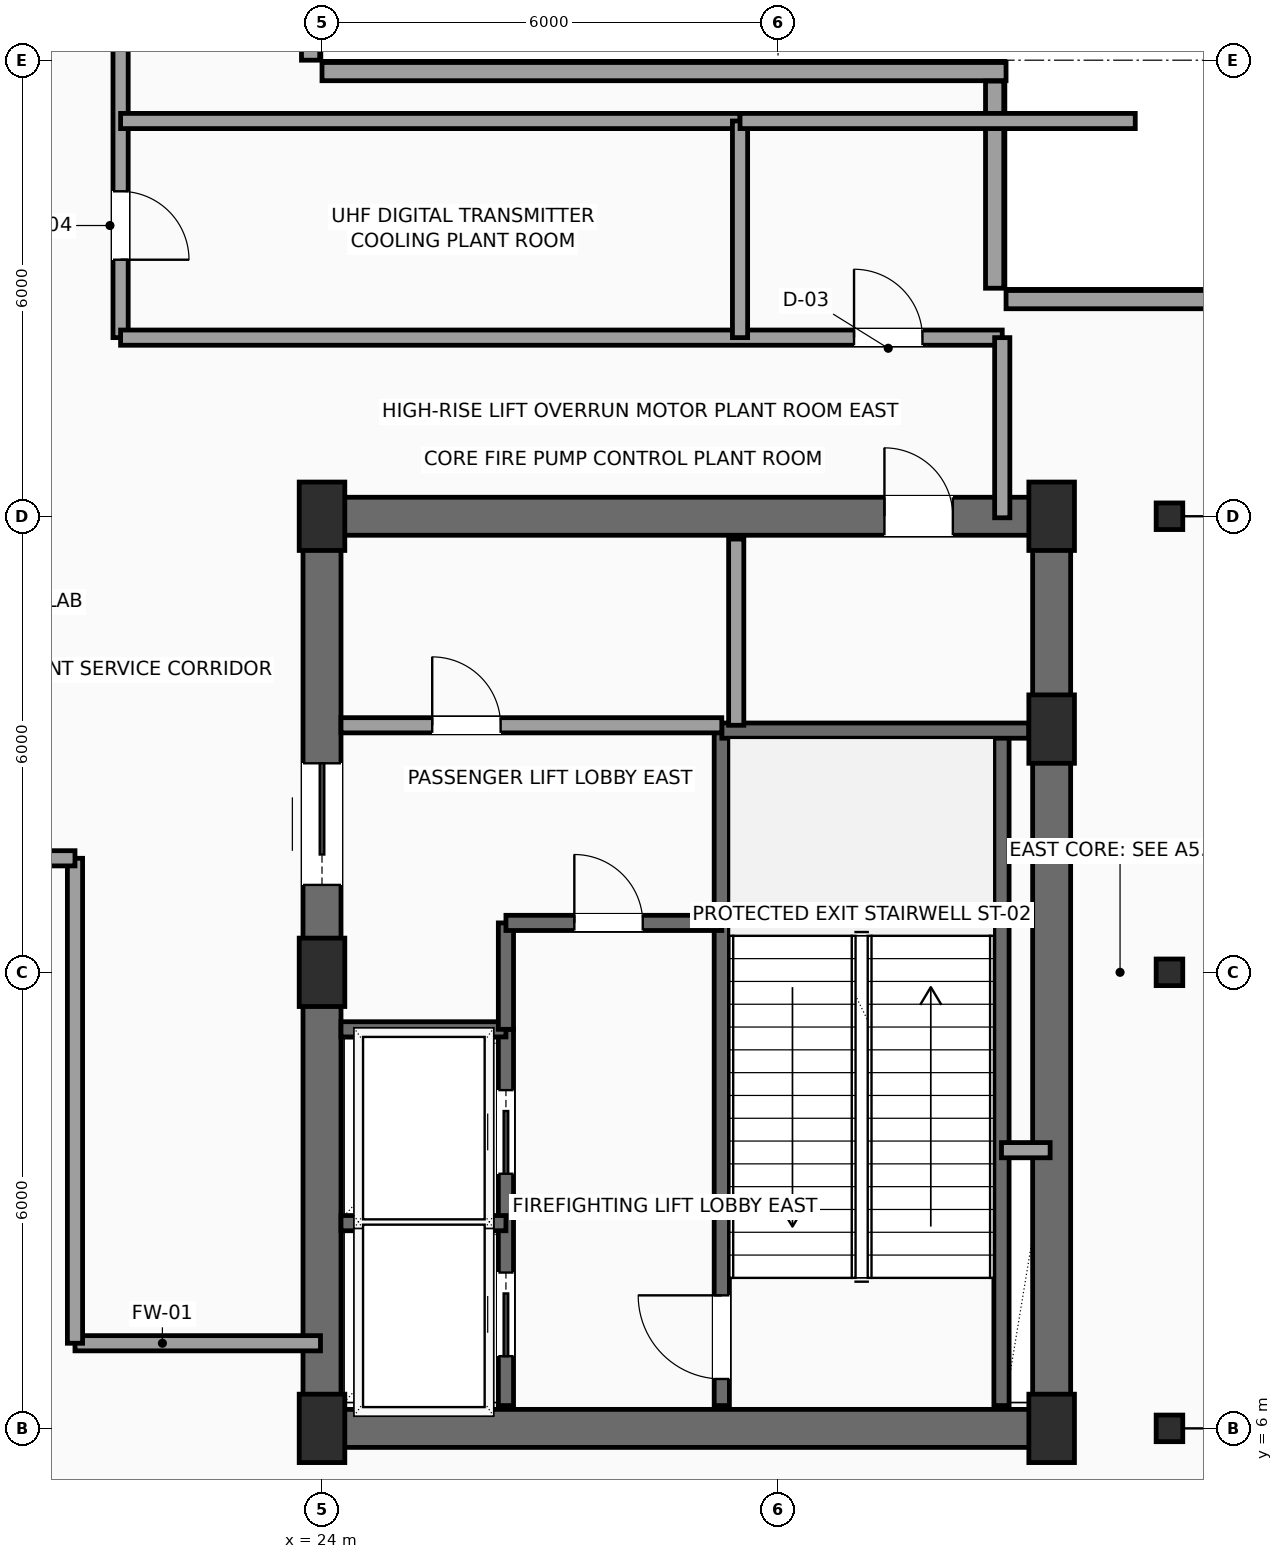
"""IFC4 building model, lengths in metres.
Left out: names, types, materials, properties, quantities, classifications, styles, units other than length and angle.
Written with IfcOpenShell. Run it as: python <this file> out.ifc"""

import sys

from ifc_helpers import new_model, si_unit, direction, frame, frame_2d, origin, origin_2d, place, context, subcontext, project, spatial, rectangle, hollow_rectangle, extrude, element, fill, save


model = new_model("IFC4")
c1 = context("Model", 3, precision=1e-05, world=origin(), true_north=direction((0.0, 1.0)))
c2 = subcontext(c1, "Body", "Model", "MODEL_VIEW")
j1 = project(units=[si_unit("LENGTHUNIT", "METRE"), si_unit("PLANEANGLEUNIT", "RADIAN")], contexts=[c1])
p1 = place(None, origin())
s1 = spatial("IfcSite", under=j1, at=p1, CompositionType="ELEMENT")
p2 = place(p1, origin())
s2 = spatial("IfcBuilding", under=s1, at=p2, CompositionType="ELEMENT")
p3 = place(p2, frame((0.0, 0.0, 300.9)))
s3 = spatial("IfcBuildingStorey", under=s2, at=p3, CompositionType="ELEMENT", Elevation=300.9)
for number, where, z_axis, x_axis in (
    (1, (24.0, 6.0, 0.0), (0.0, 0.0, 1.0), (1.0, 0.0, 0.0)),
    (2, (24.0, 12.0, 0.0), (0.0, 0.0, 1.0), (1.0, 0.0, 0.0)),
    (3, (24.0, 18.0, 0.0), (0.0, 0.0, 1.0), (1.0, 0.0, 0.0)),
    (4, (33.6, 6.0, 0.0), (0.0, 0.0, 1.0), (1.0, 0.0, 0.0)),
    (5, (33.6, 15.2, 0.0), (0.0, 0.0, 1.0), (1.0, 0.0, 0.0)),
    (6, (33.6, 18.0, 0.0), (0.0, 0.0, 1.0), (1.0, 0.0, 0.0)),
):
    element("IfcColumn", number, at=place(p3, frame(where, z_axis=z_axis, x_axis=x_axis)), inside=s3, PredefinedType="COLUMN", context=c2, shape_type="SweptSolid", body=[
        extrude(rectangle(XDim=0.6, YDim=0.9, at=origin_2d()), origin(), (0.0, 0.0, 1.0), 4.8),
    ])
for number, where, z_axis, x_axis in (
    (7, (35.15, 6.0, 0.0), (0.0, 0.0, 1.0), (1.0, 0.0, 0.0)),
    (8, (35.15, 12.0, 0.0), (0.0, 0.0, 1.0), (1.0, 0.0, 0.0)),
    (9, (35.15, 18.0, 0.0), (0.0, 0.0, 1.0), (1.0, 0.0, 0.0)),
):
    element("IfcColumn", number, at=place(p3, frame(where, z_axis=z_axis, x_axis=x_axis)), inside=s3, PredefinedType="COLUMN", context=c2, shape_type="SweptSolid", body=[
        extrude(hollow_rectangle(XDim=0.35, YDim=0.35, WallThickness=0.016, InnerFilletRadius=0.016, OuterFilletRadius=0.032, at=origin_2d()), origin(), (0.0, 0.0, 1.0), 4.8),
    ])
p4 = place(p3, frame((23.85, 26.725, 0.0), z_axis=(0.0, 0.0, 1.0), x_axis=(0.0, -1.0, 0.0)))
e10 = element("IfcWall", 10, at=p4, inside=s3, PredefinedType="SOLIDWALL", context=c2, shape_type="SweptSolid", body=[
    extrude(rectangle(XDim=2.725, YDim=0.24, at=frame_2d((1.363, 0.0))), origin(), (0.0, 0.0, 1.0), 4.525),
])
p5 = place(p3, frame((24.0, 23.85, 0.0), z_axis=(0.0, 0.0, 1.0), x_axis=(1.0, 0.0, 0.0)))
e11 = element("IfcWall", 11, at=p5, inside=s3, PredefinedType="SOLIDWALL", context=c2, shape_type="SweptSolid", body=[
    extrude(rectangle(XDim=9.0, YDim=0.24, at=frame_2d((4.5, 0.0))), origin(), (0.0, 0.0, 1.0), 4.525),
])
p6 = place(p3, frame((32.85, 23.725, 0.0), z_axis=(0.0, 0.0, 1.0), x_axis=(0.0, -1.0, 0.0)))
e12 = element("IfcWall", 12, at=p6, inside=s3, PredefinedType="SOLIDWALL", context=c2, shape_type="SweptSolid", body=[
    extrude(rectangle(XDim=2.725, YDim=0.24, at=frame_2d((1.363, 0.0))), origin(), (0.0, 0.0, 1.0), 4.525),
])
p7 = place(p3, frame((33.0, 20.85, 0.0), z_axis=(0.0, 0.0, 1.0), x_axis=(1.0, 0.0, 0.0)))
e13 = element("IfcWall", 13, at=p7, inside=s3, PredefinedType="SOLIDWALL", context=c2, shape_type="SweptSolid", body=[
    extrude(rectangle(XDim=3.0, YDim=0.24, at=frame_2d((1.5, 0.0))), origin(), (0.0, 0.0, 1.0), 4.525),
])
p8 = place(p3, frame((24.0, 6.0, 0.0), z_axis=(0.0, 0.0, 1.0), x_axis=(1.0, 0.0, 0.0)))
e14 = element("IfcWall", 14, at=p8, inside=s3, PredefinedType="SHEAR", context=c2, shape_type="SweptSolid", body=[
    extrude(rectangle(XDim=9.6, YDim=0.5, at=frame_2d((4.8, 0.0))), origin(), (0.0, 0.0, 1.0), 4.525),
])
p9 = place(p3, frame((24.0, 18.0, 0.0), z_axis=(0.0, 0.0, 1.0), x_axis=(1.0, 0.0, 0.0)))
e15 = element("IfcWall", 15, at=p9, inside=s3, PredefinedType="SHEAR", context=c2, shape_type="SweptSolid", body=[
    extrude(rectangle(XDim=9.6, YDim=0.5, at=frame_2d((4.8, 0.0))), origin(), (0.0, 0.0, 1.0), 4.525),
])
p10 = place(p9, frame((7.4, 0.0, 0.0)))
e16 = element("IfcOpeningElement", 16, at=p10, cuts=e15, PredefinedType="OPENING", context=c2, shape_type="SweptSolid", body=[
    extrude(rectangle(XDim=0.9, YDim=2.15, at=frame_2d((0.45, 1.075))), frame((0.0, 0.26, 0.0), z_axis=(0.0, -1.0, 0.0), x_axis=(1.0, 0.0, 0.0)), (0.0, 0.0, 1.0), 0.52),
])
p11 = place(p3, frame((24.0, 6.0, 0.0), z_axis=(0.0, 0.0, 1.0), x_axis=(0.0, 1.0, 0.0)))
e17 = element("IfcWall", 17, at=p11, inside=s3, PredefinedType="SHEAR", context=c2, shape_type="SweptSolid", body=[
    extrude(rectangle(XDim=12.0, YDim=0.5, at=frame_2d((6.0, 0.0))), origin(), (0.0, 0.0, 1.0), 4.525),
])
p12 = place(p11, frame((7.15, 0.0, 0.0)))
e18 = element("IfcOpeningElement", 18, at=p12, cuts=e17, PredefinedType="OPENING", context=c2, shape_type="SweptSolid", body=[
    extrude(rectangle(XDim=1.6, YDim=2.3, at=frame_2d((0.8, 1.15))), frame((0.0, 0.26, 0.0), z_axis=(0.0, -1.0, 0.0), x_axis=(1.0, 0.0, 0.0)), (0.0, 0.0, 1.0), 0.52),
])
p13 = place(p3, frame((33.6, 6.0, 0.0), z_axis=(0.0, 0.0, 1.0), x_axis=(0.0, 1.0, 0.0)))
e19 = element("IfcWall", 19, at=p13, inside=s3, PredefinedType="SHEAR", context=c2, shape_type="SweptSolid", body=[
    extrude(rectangle(XDim=12.0, YDim=0.5, at=frame_2d((6.0, 0.0))), origin(), (0.0, 0.0, 1.0), 4.525),
])
p14 = place(p3, frame((29.26, 6.3, 0.0), z_axis=(0.0, 0.0, 1.0), x_axis=(0.0, 1.0, 0.0)))
e20 = element("IfcWall", 20, at=p14, inside=s3, PredefinedType="SHEAR", context=c2, shape_type="SweptSolid", body=[
    extrude(rectangle(XDim=8.88, YDim=0.2, at=frame_2d((4.44, 0.0))), origin(), (0.0, 0.0, 1.0), 4.525),
])
p15 = place(p14, frame((0.35, 0.0, 0.0)))
e21 = element("IfcOpeningElement", 21, at=p15, cuts=e20, PredefinedType="OPENING", context=c2, shape_type="SweptSolid", body=[
    extrude(rectangle(XDim=1.1, YDim=2.2, at=frame_2d((0.55, 1.1))), frame((0.0, 0.11, 0.0), z_axis=(0.0, -1.0, 0.0), x_axis=(1.0, 0.0, 0.0)), (0.0, 0.0, 1.0), 0.22),
])
p16 = place(p3, frame((32.94, 6.3, 0.0), z_axis=(0.0, 0.0, 1.0), x_axis=(0.0, 1.0, 0.0)))
e22 = element("IfcWall", 22, at=p16, inside=s3, PredefinedType="SHEAR", context=c2, shape_type="SweptSolid", body=[
    extrude(rectangle(XDim=8.88, YDim=0.2, at=frame_2d((4.44, 0.0))), origin(), (0.0, 0.0, 1.0), 4.525),
])
p17 = place(p3, frame((29.26, 15.18, 0.0), z_axis=(0.0, 0.0, 1.0), x_axis=(1.0, 0.0, 0.0)))
e23 = element("IfcWall", 23, at=p17, inside=s3, PredefinedType="SHEAR", context=c2, shape_type="SweptSolid", body=[
    extrude(rectangle(XDim=4.04, YDim=0.2, at=frame_2d((2.02, 0.0))), origin(), (0.0, 0.0, 1.0), 4.525),
])
p18 = place(p3, frame((26.42, 6.3, 0.0), z_axis=(0.0, 0.0, 1.0), x_axis=(0.0, 1.0, 0.0)))
e24 = element("IfcWall", 24, at=p18, inside=s3, PredefinedType="SHEAR", context=c2, shape_type="SweptSolid", body=[
    extrude(rectangle(XDim=4.95, YDim=0.2, at=frame_2d((2.475, 0.0))), origin(), (0.0, 0.0, 1.0), 4.525),
])
p19 = place(p18, frame((0.65, 0.0, 0.0)))
e25 = element("IfcOpeningElement", 25, at=p19, cuts=e24, PredefinedType="OPENING", context=c2, shape_type="SweptSolid", body=[
    extrude(rectangle(XDim=1.1, YDim=2.2, at=frame_2d((0.55, 1.1))), frame((0.0, 0.11, 0.0), z_axis=(0.0, -1.0, 0.0), x_axis=(1.0, 0.0, 0.0)), (0.0, 0.0, 1.0), 0.22),
])
p20 = place(p18, frame((3.05, 0.0, 0.0)))
e26 = element("IfcOpeningElement", 26, at=p20, cuts=e24, PredefinedType="OPENING", context=c2, shape_type="SweptSolid", body=[
    extrude(rectangle(XDim=1.1, YDim=2.2, at=frame_2d((0.55, 1.1))), frame((0.0, 0.11, 0.0), z_axis=(0.0, -1.0, 0.0), x_axis=(1.0, 0.0, 0.0)), (0.0, 0.0, 1.0), 0.22),
])
for number, where, z_axis, x_axis in (
    (27, (24.25, 8.7, 0.0), (0.0, 0.0, 1.0), (1.0, 0.0, 0.0)),
    (28, (24.25, 11.25, 0.0), (0.0, 0.0, 1.0), (1.0, 0.0, 0.0)),
):
    element("IfcWall", number, at=place(p3, frame(where, z_axis=z_axis, x_axis=x_axis)), inside=s3, PredefinedType="SHEAR", context=c2, shape_type="SweptSolid", body=[
        extrude(rectangle(XDim=2.17, YDim=0.2, at=frame_2d((1.085, 0.0))), origin(), (0.0, 0.0, 1.0), 4.525),
    ])
p21 = place(p3, frame((26.42, 11.25, 0.0), z_axis=(0.0, 0.0, 1.0), x_axis=(0.0, 1.0, 0.0)))
e29 = element("IfcWall", 29, at=p21, inside=s3, PredefinedType="SHEAR", context=c2, shape_type="SweptSolid", body=[
    extrude(rectangle(XDim=1.4, YDim=0.2, at=frame_2d((0.7, 0.0))), origin(), (0.0, 0.0, 1.0), 4.525),
])
p22 = place(p3, frame((26.42, 12.65, 0.0), z_axis=(0.0, 0.0, 1.0), x_axis=(1.0, 0.0, 0.0)))
e30 = element("IfcWall", 30, at=p22, inside=s3, PredefinedType="SHEAR", context=c2, shape_type="SweptSolid", body=[
    extrude(rectangle(XDim=2.84, YDim=0.2, at=frame_2d((1.42, 0.0))), origin(), (0.0, 0.0, 1.0), 4.525),
])
p23 = place(p22, frame((0.9, 0.0, 0.0)))
e31 = element("IfcOpeningElement", 31, at=p23, cuts=e30, PredefinedType="OPENING", context=c2, shape_type="SweptSolid", body=[
    extrude(rectangle(XDim=0.9, YDim=2.15, at=frame_2d((0.45, 1.075))), frame((0.0, 0.11, 0.0), z_axis=(0.0, -1.0, 0.0), x_axis=(1.0, 0.0, 0.0)), (0.0, 0.0, 1.0), 0.22),
])
p24 = place(p3, frame((32.94, 9.66, 0.0), z_axis=(0.0, 0.0, 1.0), x_axis=(1.0, 0.0, 0.0)))
e32 = element("IfcWall", 32, at=p24, inside=s3, PredefinedType="SOLIDWALL", context=c2, shape_type="SweptSolid", body=[
    extrude(rectangle(XDim=0.64, YDim=0.2, at=frame_2d((0.32, 0.0))), origin(), (0.0, 0.0, 1.0), 4.525),
])
p25 = place(p3, frame((24.25, 15.25, 0.0), z_axis=(0.0, 0.0, 1.0), x_axis=(1.0, 0.0, 0.0)))
e33 = element("IfcWall", 33, at=p25, inside=s3, PredefinedType="SOLIDWALL", context=c2, shape_type="SweptSolid", body=[
    extrude(rectangle(XDim=5.01, YDim=0.2, at=frame_2d((2.505, 0.0))), origin(), (0.0, 0.0, 1.0), 4.525),
])
p26 = place(p25, frame((1.2, 0.0, 0.0)))
e34 = element("IfcOpeningElement", 34, at=p26, cuts=e33, PredefinedType="OPENING", context=c2, shape_type="SweptSolid", body=[
    extrude(rectangle(XDim=0.9, YDim=2.15, at=frame_2d((0.45, 1.075))), frame((0.0, 0.11, 0.0), z_axis=(0.0, -1.0, 0.0), x_axis=(1.0, 0.0, 0.0)), (0.0, 0.0, 1.0), 0.22),
])
p27 = place(p3, frame((29.45, 15.25, 0.0), z_axis=(0.0, 0.0, 1.0), x_axis=(0.0, 1.0, 0.0)))
e35 = element("IfcWall", 35, at=p27, inside=s3, PredefinedType="SOLIDWALL", context=c2, shape_type="SweptSolid", body=[
    extrude(rectangle(XDim=2.45, YDim=0.2, at=frame_2d((1.225, 0.0))), origin(), (0.0, 0.0, 1.0), 4.525),
])
p28 = place(p3, frame((23.98, 7.12, 0.0), z_axis=(0.0, 0.0, 1.0), x_axis=(-1.0, 0.0, 0.0)))
e36 = element("IfcWall", 36, at=p28, inside=s3, PredefinedType="SOLIDWALL", context=c2, shape_type="SweptSolid", body=[
    extrude(rectangle(XDim=3.23, YDim=0.2, at=frame_2d((1.615, 0.0))), origin(), (0.0, 0.0, 1.0), 4.525),
])
p29 = place(p3, frame((20.75, 7.12, 0.0), z_axis=(0.0, 0.0, 1.0), x_axis=(0.0, 1.0, 0.0)))
e37 = element("IfcWall", 37, at=p29, inside=s3, PredefinedType="SOLIDWALL", context=c2, shape_type="SweptSolid", body=[
    extrude(rectangle(XDim=6.38, YDim=0.2, at=frame_2d((3.19, 0.0))), origin(), (0.0, 0.0, 1.0), 4.525),
])
p30 = place(p3, frame((20.75, 13.5, 0.0), z_axis=(0.0, 0.0, 1.0), x_axis=(-1.0, 0.0, 0.0)))
e38 = element("IfcWall", 38, at=p30, inside=s3, PredefinedType="SOLIDWALL", context=c2, shape_type="SweptSolid", body=[
    extrude(rectangle(XDim=13.55, YDim=0.2, at=frame_2d((6.775, 0.0))), origin(), (0.0, 0.0, 1.0), 4.525),
])
p31 = place(p30, frame((9.275, 0.0, 0.0)))
e39 = element("IfcOpeningElement", 39, at=p31, cuts=e38, PredefinedType="OPENING", context=c2, shape_type="SweptSolid", body=[
    extrude(rectangle(XDim=0.9, YDim=2.15, at=frame_2d((0.45, 1.075))), frame((0.0, 0.11, 0.0), z_axis=(0.0, -1.0, 0.0), x_axis=(1.0, 0.0, 0.0)), (0.0, 0.0, 1.0), 0.22),
])
p32 = place(p3, frame((21.35, 27.58, 0.0), z_axis=(0.0, 0.0, 1.0), x_axis=(0.0, -1.0, 0.0)))
e40 = element("IfcWall", 40, at=p32, inside=s3, PredefinedType="SOLIDWALL", context=c2, shape_type="SweptSolid", body=[
    extrude(rectangle(XDim=7.23, YDim=0.2, at=frame_2d((3.615, 0.0))), origin(), (0.0, 0.0, 1.0), 4.525),
])
p33 = place(p32, frame((5.305, 0.0, 0.0)))
e41 = element("IfcOpeningElement", 41, at=p33, cuts=e40, PredefinedType="OPENING", context=c2, shape_type="SweptSolid", body=[
    extrude(rectangle(XDim=0.9, YDim=2.15, at=frame_2d((0.45, 1.075))), frame((0.0, 0.11, 0.0), z_axis=(0.0, -1.0, 0.0), x_axis=(1.0, 0.0, 0.0)), (0.0, 0.0, 1.0), 0.22),
])
p34 = place(p3, frame((21.35, 20.35, 0.0), z_axis=(0.0, 0.0, 1.0), x_axis=(1.0, 0.0, 0.0)))
e42 = element("IfcWall", 42, at=p34, inside=s3, PredefinedType="SOLIDWALL", context=c2, shape_type="SweptSolid", body=[
    extrude(rectangle(XDim=11.6, YDim=0.2, at=frame_2d((5.8, 0.0))), origin(), (0.0, 0.0, 1.0), 4.525),
])
p35 = place(p34, frame((9.65, 0.0, 0.0)))
e43 = element("IfcOpeningElement", 43, at=p35, cuts=e42, PredefinedType="OPENING", context=c2, shape_type="SweptSolid", body=[
    extrude(rectangle(XDim=0.9, YDim=2.15, at=frame_2d((0.45, 1.075))), frame((0.0, 0.11, 0.0), z_axis=(0.0, -1.0, 0.0), x_axis=(1.0, 0.0, 0.0)), (0.0, 0.0, 1.0), 0.22),
])
p36 = place(p3, frame((32.95, 20.35, 0.0), z_axis=(0.0, 0.0, 1.0), x_axis=(0.0, -1.0, 0.0)))
e44 = element("IfcWall", 44, at=p36, inside=s3, PredefinedType="SOLIDWALL", context=c2, shape_type="SweptSolid", body=[
    extrude(rectangle(XDim=2.37, YDim=0.2, at=frame_2d((1.185, 0.0))), origin(), (0.0, 0.0, 1.0), 4.525),
])
p37 = place(p3, frame((21.35, 23.2, 0.0), z_axis=(0.0, 0.0, 1.0), x_axis=(1.0, 0.0, 0.0)))
e45 = element("IfcWall", 45, at=p37, inside=s3, PredefinedType="SOLIDWALL", context=c2, shape_type="SweptSolid", body=[
    extrude(rectangle(XDim=8.15, YDim=0.2, at=frame_2d((4.075, 0.0))), origin(), (0.0, 0.0, 1.0), 4.525),
])
p38 = place(p3, frame((29.5, 20.35, 0.0), z_axis=(0.0, 0.0, 1.0), x_axis=(0.0, 1.0, 0.0)))
e46 = element("IfcWall", 46, at=p38, inside=s3, PredefinedType="SOLIDWALL", context=c2, shape_type="SweptSolid", body=[
    extrude(rectangle(XDim=2.85, YDim=0.2, at=frame_2d((1.425, 0.0))), origin(), (0.0, 0.0, 1.0), 4.525),
])
p39 = place(p3, frame((29.5, 23.2, 0.0), z_axis=(0.0, 0.0, 1.0), x_axis=(1.0, 0.0, 0.0)))
e47 = element("IfcWall", 47, at=p39, inside=s3, PredefinedType="SOLIDWALL", context=c2, shape_type="SweptSolid", body=[
    extrude(rectangle(XDim=5.2, YDim=0.2, at=frame_2d((2.6, 0.0))), origin(), (0.0, 0.0, 1.0), 4.525),
])
p40 = place(p10, origin())
e48 = element("IfcDoor", 48, at=p40, inside=s3, OperationType="SINGLE_SWING_LEFT", PredefinedType="DOOR", context=c2, shape_type="SweptSolid", body=[
    extrude(rectangle(XDim=0.9, YDim=2.15, at=frame_2d((0.45, 1.075))), frame((0.0, 0.025, 0.0), z_axis=(0.0, -1.0, 0.0), x_axis=(1.0, 0.0, 0.0)), (0.0, 0.0, 1.0), 0.05),
])
fill(e16, e48)
p41 = place(p12, origin())
e49 = element("IfcDoor", 49, at=p41, inside=s3, OperationType="DOUBLE_DOOR_SLIDING", PredefinedType="DOOR", context=c2, shape_type="SweptSolid", body=[
    extrude(rectangle(XDim=1.6, YDim=2.3, at=frame_2d((0.8, 1.15))), frame((0.0, 0.025, 0.0), z_axis=(0.0, -1.0, 0.0), x_axis=(1.0, 0.0, 0.0)), (0.0, 0.0, 1.0), 0.05),
])
fill(e18, e49)
p42 = place(p15, origin())
e50 = element("IfcDoor", 50, at=p42, inside=s3, OperationType="SINGLE_SWING_RIGHT", PredefinedType="DOOR", context=c2, shape_type="SweptSolid", body=[
    extrude(rectangle(XDim=1.1, YDim=2.2, at=frame_2d((0.55, 1.1))), frame((0.0, 0.025, 0.0), z_axis=(0.0, -1.0, 0.0), x_axis=(1.0, 0.0, 0.0)), (0.0, 0.0, 1.0), 0.05),
])
fill(e21, e50)
p43 = place(p19, origin())
e51 = element("IfcDoor", 51, at=p43, inside=s3, OperationType="SLIDING_TO_LEFT", PredefinedType="DOOR", context=c2, shape_type="SweptSolid", body=[
    extrude(rectangle(XDim=1.1, YDim=2.2, at=frame_2d((0.55, 1.1))), frame((0.0, 0.025, 0.0), z_axis=(0.0, -1.0, 0.0), x_axis=(1.0, 0.0, 0.0)), (0.0, 0.0, 1.0), 0.05),
])
fill(e25, e51)
p44 = place(p20, origin())
e52 = element("IfcDoor", 52, at=p44, inside=s3, OperationType="SLIDING_TO_LEFT", PredefinedType="DOOR", context=c2, shape_type="SweptSolid", body=[
    extrude(rectangle(XDim=1.1, YDim=2.2, at=frame_2d((0.55, 1.1))), frame((0.0, 0.025, 0.0), z_axis=(0.0, -1.0, 0.0), x_axis=(1.0, 0.0, 0.0)), (0.0, 0.0, 1.0), 0.05),
])
fill(e26, e52)
p45 = place(p23, origin())
e53 = element("IfcDoor", 53, at=p45, inside=s3, OperationType="SINGLE_SWING_LEFT", PredefinedType="DOOR", context=c2, shape_type="SweptSolid", body=[
    extrude(rectangle(XDim=0.9, YDim=2.15, at=frame_2d((0.45, 1.075))), frame((0.0, 0.025, 0.0), z_axis=(0.0, -1.0, 0.0), x_axis=(1.0, 0.0, 0.0)), (0.0, 0.0, 1.0), 0.05),
])
fill(e31, e53)
p46 = place(p26, origin())
e54 = element("IfcDoor", 54, at=p46, inside=s3, OperationType="SINGLE_SWING_LEFT", PredefinedType="DOOR", context=c2, shape_type="SweptSolid", body=[
    extrude(rectangle(XDim=0.9, YDim=2.15, at=frame_2d((0.45, 1.075))), frame((0.0, 0.025, 0.0), z_axis=(0.0, -1.0, 0.0), x_axis=(1.0, 0.0, 0.0)), (0.0, 0.0, 1.0), 0.05),
])
fill(e34, e54)
p47 = place(p33, origin())
e55 = element("IfcDoor", 55, at=p47, inside=s3, OperationType="SINGLE_SWING_RIGHT", PredefinedType="DOOR", context=c2, shape_type="SweptSolid", body=[
    extrude(rectangle(XDim=0.9, YDim=2.15, at=frame_2d((0.45, 1.075))), frame((0.0, 0.025, 0.0), z_axis=(0.0, -1.0, 0.0), x_axis=(1.0, 0.0, 0.0)), (0.0, 0.0, 1.0), 0.05),
])
fill(e41, e55)
p48 = place(p35, origin())
e56 = element("IfcDoor", 56, at=p48, inside=s3, OperationType="SINGLE_SWING_LEFT", PredefinedType="DOOR", context=c2, shape_type="SweptSolid", body=[
    extrude(rectangle(XDim=0.9, YDim=2.15, at=frame_2d((0.45, 1.075))), frame((0.0, 0.025, 0.0), z_axis=(0.0, -1.0, 0.0), x_axis=(1.0, 0.0, 0.0)), (0.0, 0.0, 1.0), 0.05),
])
fill(e43, e56)
save(model, sys.argv[1])
